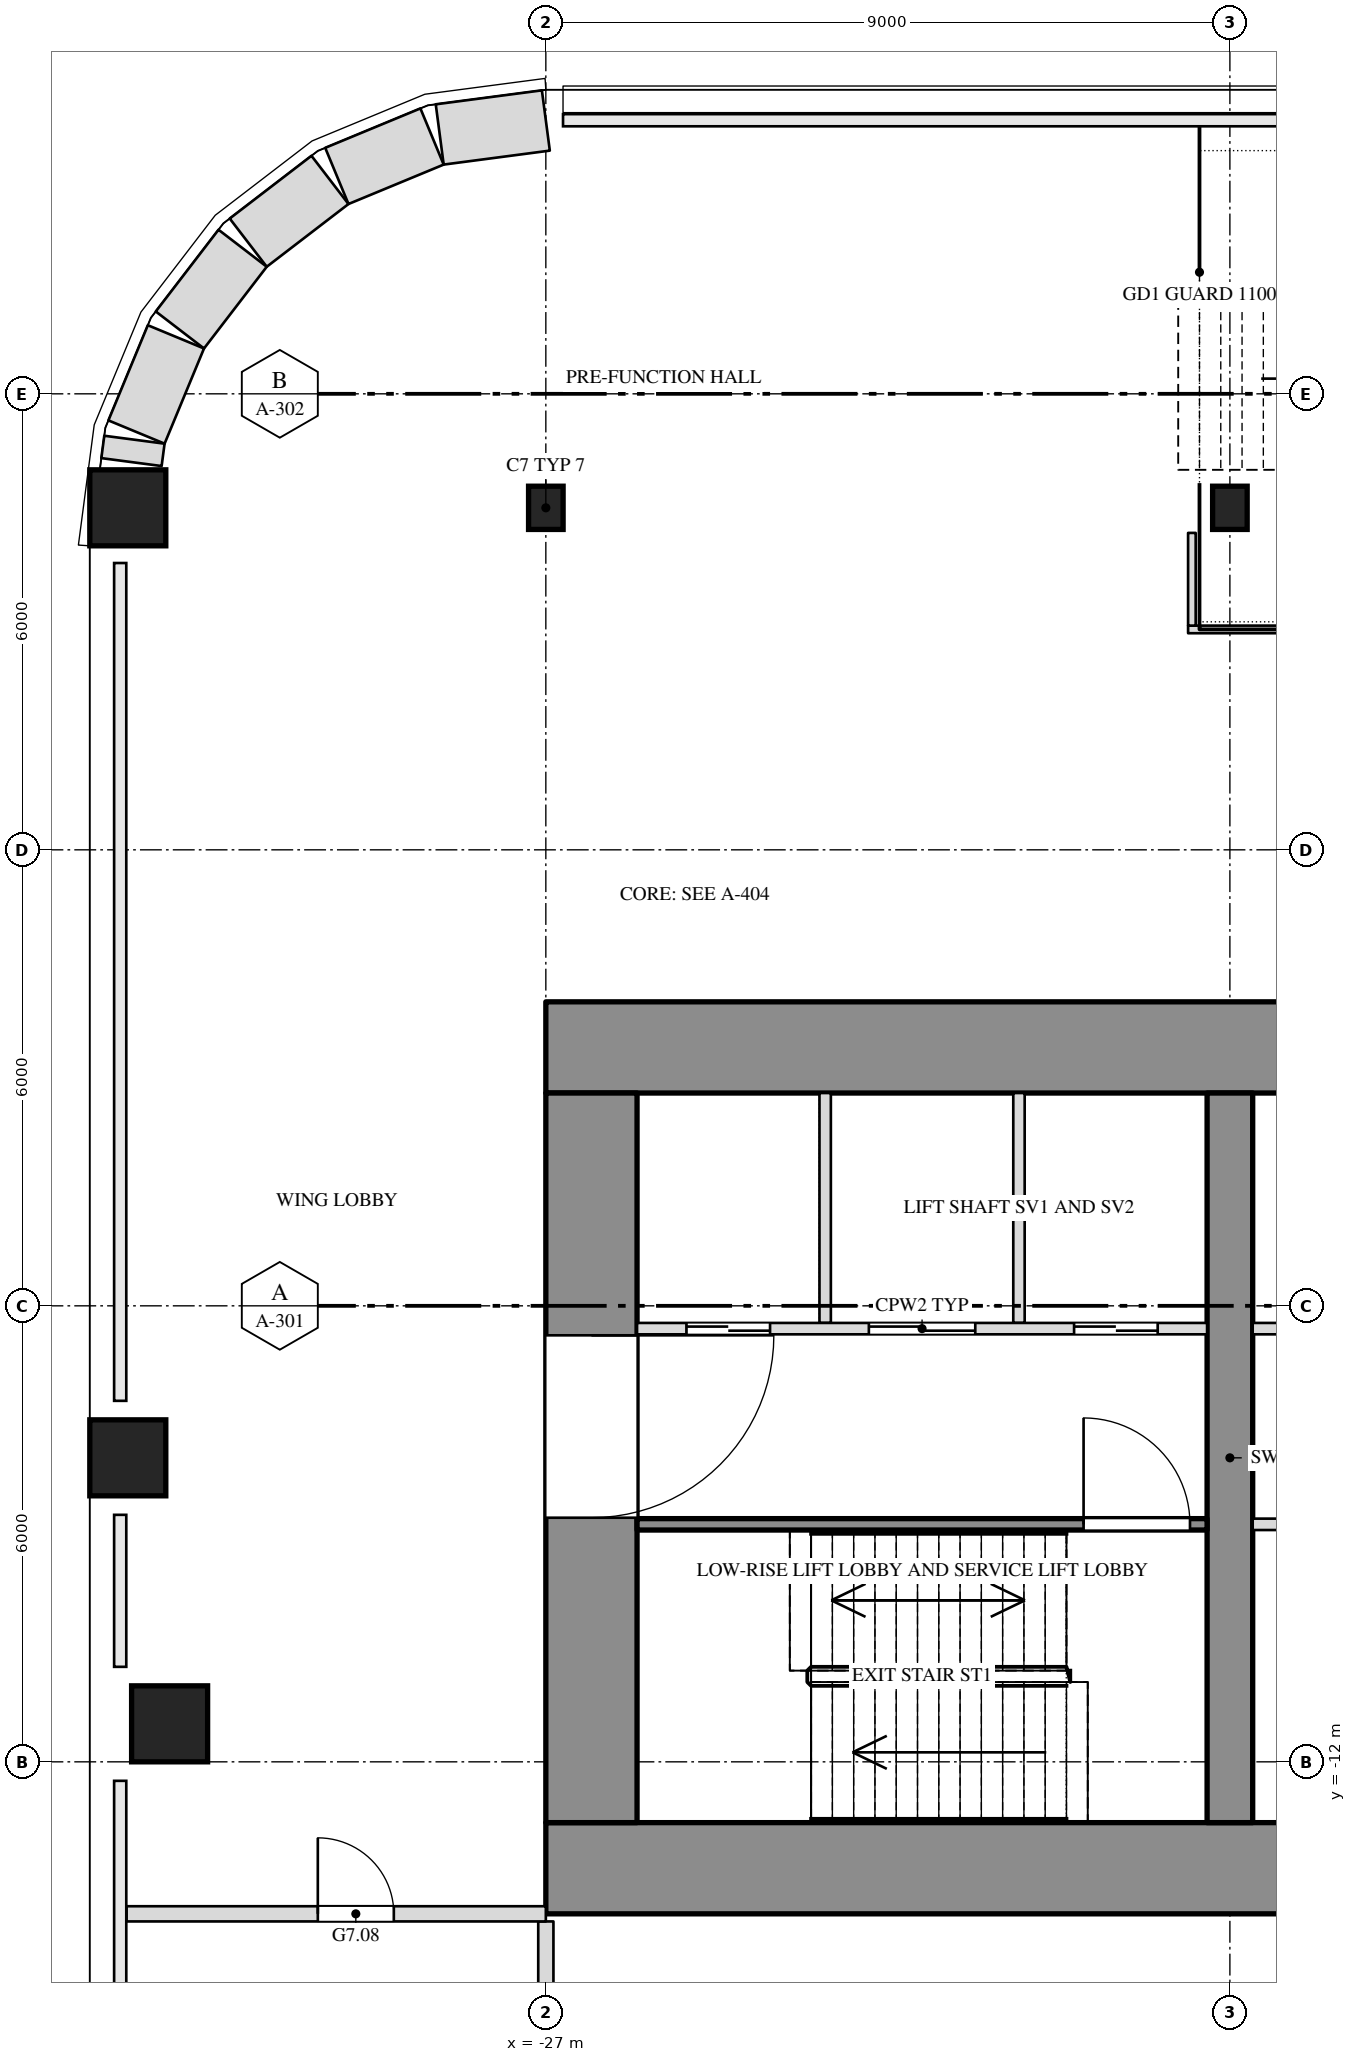
"""IFC4 building model, lengths in metres.
Left out: names, types, materials, properties, quantities, classifications, styles, units other than length and angle.
Written with IfcOpenShell. Run it as: python <this file> out.ifc"""

import sys

from ifc_helpers import new_model, si_unit, direction, frame, frame_2d, origin, origin_2d, place, context, subcontext, project, spatial, rectangle, i_section, extrude, element, fill, save


model = new_model("IFC4")
c1 = context("Model", 3, precision=1e-05, world=origin(), true_north=direction((0.0, 1.0)))
c2 = subcontext(c1, "Body", "Model", "MODEL_VIEW")
j1 = project(units=[si_unit("LENGTHUNIT", "METRE"), si_unit("PLANEANGLEUNIT", "RADIAN")], contexts=[c1])
p1 = place(None, origin())
s1 = spatial("IfcSite", under=j1, at=p1, CompositionType="ELEMENT")
p2 = place(p1, origin())
s2 = spatial("IfcBuilding", under=s1, at=p2, CompositionType="ELEMENT")
p3 = place(p2, frame((0.0, 0.0, 43.5)))
s3 = spatial("IfcBuildingStorey", under=s2, at=p3, CompositionType="ELEMENT", Elevation=43.5)
for number, where, z_axis, x_axis in (
    (1, (-31.95, -11.5, 0.0), (0.0, 0.0, 1.0), (1.0, 0.0, 0.0)),
    (2, (-32.5, -8.0, 0.0), (0.0, 0.0, 1.0), (1.0, 0.0, 0.0)),
    (3, (-32.5, 4.5, 0.0), (0.0, 0.0, 1.0), (1.0, 0.0, 0.0)),
):
    element("IfcColumn", number, at=place(p3, frame(where, z_axis=z_axis, x_axis=x_axis)), inside=s3, PredefinedType="COLUMN", context=c2, shape_type="SweptSolid", body=[
        extrude(rectangle(XDim=1.0, YDim=1.0, at=origin_2d()), origin(), (0.0, 0.0, 1.0), 4.5),
    ])
for number, where, z_axis, x_axis in (
    (4, (-27.0, 4.5, 0.0), (0.0, 0.0, 1.0), (1.0, 0.0, 0.0)),
    (5, (-18.0, 4.5, 0.0), (0.0, 0.0, 1.0), (1.0, 0.0, 0.0)),
):
    element("IfcColumn", number, at=place(p3, frame(where, z_axis=z_axis, x_axis=x_axis)), inside=s3, PredefinedType="COLUMN", context=c2, shape_type="SweptSolid", body=[
        extrude(i_section(OverallWidth=0.455, OverallDepth=0.569, WebThickness=0.078, FlangeThickness=0.125, at=origin_2d()), origin(), (0.0, 0.0, 1.0), 4.5),
    ])
p4 = place(p3, frame((-27.0, -2.6, 0.0), z_axis=(0.0, 0.0, 1.0), x_axis=(1.0, 0.0, 0.0)))
e6 = element("IfcWall", 6, at=p4, inside=s3, PredefinedType="SHEAR", context=c2, shape_type="SweptSolid", body=[
    extrude(rectangle(XDim=54.0, YDim=1.2, at=frame_2d((27.0, 0.0))), origin(), (0.0, 0.0, 1.0), 4.25),
])
p5 = place(p4, frame((15.15, 0.0, 0.0)))
e7 = element("IfcOpeningElement", 7, at=p5, cuts=e6, PredefinedType="OPENING", context=c2, shape_type="SweptSolid", body=[
    extrude(rectangle(XDim=2.4, YDim=2.1, at=frame_2d((1.2, 1.05))), frame((0.0, 0.612, 0.0), z_axis=(0.0, -1.0, 0.0), x_axis=(1.0, 0.0, 0.0)), (0.0, 0.0, 1.0), 1.224),
])
p6 = place(p4, frame((36.45, 0.0, 0.0)))
e8 = element("IfcOpeningElement", 8, at=p6, cuts=e6, PredefinedType="OPENING", context=c2, shape_type="SweptSolid", body=[
    extrude(rectangle(XDim=2.4, YDim=2.1, at=frame_2d((1.2, 1.05))), frame((0.0, 0.612, 0.0), z_axis=(0.0, -1.0, 0.0), x_axis=(1.0, 0.0, 0.0)), (0.0, 0.0, 1.0), 1.224),
])
p7 = place(p3, frame((-27.0, -13.4, 0.0), z_axis=(0.0, 0.0, 1.0), x_axis=(1.0, 0.0, 0.0)))
e9 = element("IfcWall", 9, at=p7, inside=s3, PredefinedType="SHEAR", context=c2, shape_type="SweptSolid", body=[
    extrude(rectangle(XDim=54.0, YDim=1.2, at=frame_2d((27.0, 0.0))), origin(), (0.0, 0.0, 1.0), 4.25),
])
p8 = place(p7, frame((16.45, 0.0, 0.0)))
e10 = element("IfcOpeningElement", 10, at=p8, cuts=e9, PredefinedType="OPENING", context=c2, shape_type="SweptSolid", body=[
    extrude(rectangle(XDim=1.0, YDim=2.1, at=frame_2d((0.5, 1.05))), frame((0.0, 0.612, 0.0), z_axis=(0.0, -1.0, 0.0), x_axis=(1.0, 0.0, 0.0)), (0.0, 0.0, 1.0), 1.224),
])
p9 = place(p7, frame((36.55, 0.0, 0.0)))
e11 = element("IfcOpeningElement", 11, at=p9, cuts=e9, PredefinedType="OPENING", context=c2, shape_type="SweptSolid", body=[
    extrude(rectangle(XDim=1.0, YDim=2.1, at=frame_2d((0.5, 1.05))), frame((0.0, 0.612, 0.0), z_axis=(0.0, -1.0, 0.0), x_axis=(1.0, 0.0, 0.0)), (0.0, 0.0, 1.0), 1.224),
])
p10 = place(p3, frame((-26.4, -12.8, 0.0), z_axis=(0.0, 0.0, 1.0), x_axis=(0.0, 1.0, 0.0)))
e12 = element("IfcWall", 12, at=p10, inside=s3, PredefinedType="SHEAR", context=c2, shape_type="SweptSolid", body=[
    extrude(rectangle(XDim=9.6, YDim=1.2, at=frame_2d((4.8, 0.0))), origin(), (0.0, 0.0, 1.0), 4.25),
])
p11 = place(p10, frame((4.012, 0.0, 0.0)))
e13 = element("IfcOpeningElement", 13, at=p11, cuts=e12, PredefinedType="OPENING", context=c2, shape_type="SweptSolid", body=[
    extrude(rectangle(XDim=2.4, YDim=2.1, at=frame_2d((1.2, 1.05))), frame((0.0, 0.612, 0.0), z_axis=(0.0, -1.0, 0.0), x_axis=(1.0, 0.0, 0.0)), (0.0, 0.0, 1.0), 1.224),
])
p12 = place(p3, frame((-18.0, -12.8, 0.0), z_axis=(0.0, 0.0, 1.0), x_axis=(0.0, 1.0, 0.0)))
e14 = element("IfcWall", 14, at=p12, inside=s3, PredefinedType="SHEAR", context=c2, shape_type="SweptSolid", body=[
    extrude(rectangle(XDim=9.6, YDim=0.6, at=frame_2d((4.8, 0.0))), origin(), (0.0, 0.0, 1.0), 4.25),
])
p13 = place(p3, frame((-27.0, -17.0, 0.0), z_axis=(0.0, 0.0, 1.0), x_axis=(0.0, 1.0, 0.0)))
e15 = element("IfcWall", 15, at=p13, inside=s3, PredefinedType="PARTITIONING", context=c2, shape_type="SweptSolid", body=[
    extrude(rectangle(XDim=2.9, YDim=0.2, at=frame_2d((1.45, 0.0))), origin(), (0.0, 0.0, 1.0), 3.638),
])
p14 = place(p3, frame((-32.516, -14.0, 0.0), z_axis=(0.0, 0.0, 1.0), x_axis=(1.0, 0.0, 0.0)))
e16 = element("IfcWall", 16, at=p14, inside=s3, PredefinedType="PARTITIONING", context=c2, shape_type="SweptSolid", body=[
    extrude(rectangle(XDim=5.516, YDim=0.2, at=frame_2d((2.758, 0.0))), origin(), (0.0, 0.0, 1.0), 4.25),
])
p15 = place(p14, frame((2.516, 0.0, 0.0)))
e17 = element("IfcOpeningElement", 17, at=p15, cuts=e16, PredefinedType="OPENING", context=c2, shape_type="SweptSolid", body=[
    extrude(rectangle(XDim=1.0, YDim=2.1, at=frame_2d((0.5, 1.05))), frame((0.0, 0.112, 0.0), z_axis=(0.0, -1.0, 0.0), x_axis=(1.0, 0.0, 0.0)), (0.0, 0.0, 1.0), 0.224),
])
p16 = place(p3, frame((-18.55, 2.9, 0.0), z_axis=(0.0, 0.0, 1.0), x_axis=(1.0, 0.0, 0.0)))
e18 = element("IfcWall", 18, at=p16, inside=s3, PredefinedType="PARTITIONING", context=c2, shape_type="SweptSolid", body=[
    extrude(rectangle(XDim=51.066, YDim=0.1, at=frame_2d((25.533, 0.0))), origin(), (0.0, 0.0, 1.0), 4.25),
])
p17 = place(p16, frame((40.65, 0.0, 0.0)))
e19 = element("IfcOpeningElement", 19, at=p17, cuts=e18, PredefinedType="OPENING", context=c2, shape_type="SweptSolid", body=[
    extrude(rectangle(XDim=1.8, YDim=2.1, at=frame_2d((0.9, 1.05))), frame((0.0, 0.062, 0.0), z_axis=(0.0, -1.0, 0.0), x_axis=(1.0, 0.0, 0.0)), (0.0, 0.0, 1.0), 0.124),
])
p18 = place(p16, frame((47.55, 0.0, 0.0)))
e20 = element("IfcOpeningElement", 20, at=p18, cuts=e18, PredefinedType="OPENING", context=c2, shape_type="SweptSolid", body=[
    extrude(rectangle(XDim=1.0, YDim=2.1, at=frame_2d((0.5, 1.05))), frame((0.0, 0.062, 0.0), z_axis=(0.0, -1.0, 0.0), x_axis=(1.0, 0.0, 0.0)), (0.0, 0.0, 1.0), 0.124),
])
p19 = place(p3, frame((-18.5, 2.95, 0.0), z_axis=(0.0, 0.0, 1.0), x_axis=(0.0, 1.0, 0.0)))
e21 = element("IfcWall", 21, at=p19, inside=s3, PredefinedType="PARTITIONING", context=c2, shape_type="SweptSolid", body=[
    extrude(rectangle(XDim=1.22, YDim=0.1, at=frame_2d((0.61, 0.0))), origin(), (0.0, 0.0, 1.0), 4.25),
])
p20 = place(p3, frame((-27.0, 9.597, 0.0), z_axis=(0.0, 0.0, 1.0), x_axis=(-0.99144603414, -0.130517283865, 0.0)))
e22 = element("IfcWall", 22, at=p20, inside=s3, PredefinedType="SOLIDWALL", context=c2, shape_type="SweptSolid", body=[
    extrude(rectangle(XDim=1.408, YDim=0.8, at=frame_2d((0.704, 0.0))), origin(), (0.0, 0.0, 1.0), 4.25),
])
p21 = place(p3, frame((-28.497, 9.386, 0.0), z_axis=(0.0, 0.0, 1.0), x_axis=(-0.923847774587, -0.38276009378, 0.0)))
e23 = element("IfcWall", 23, at=p21, inside=s3, PredefinedType="SOLIDWALL", context=c2, shape_type="SweptSolid", body=[
    extrude(rectangle(XDim=1.355, YDim=0.8, at=frame_2d((0.678, 0.0))), origin(), (0.0, 0.0, 1.0), 4.25),
])
for number, where, z_axis, x_axis in (
    (24, (-29.84, 8.815, 0.0), (0.0, 0.0, 1.0), (-0.793, -0.609, 0.0)),
    (25, (-30.989, 7.916, 0.0), (0.0, 0.0, 1.0), (-0.609, -0.793, 0.0)),
):
    element("IfcWall", number, at=place(p3, frame(where, z_axis=z_axis, x_axis=x_axis)), inside=s3, PredefinedType="SOLIDWALL", context=c2, shape_type="SweptSolid", body=[
        extrude(rectangle(XDim=1.356, YDim=0.8, at=frame_2d((0.678, 0.0))), origin(), (0.0, 0.0, 1.0), 4.25),
    ])
p22 = place(p3, frame((-31.867, 6.75, 0.0), z_axis=(0.0, 0.0, 1.0), x_axis=(-0.38276009378, -0.923847774587, 0.0)))
e26 = element("IfcWall", 26, at=p22, inside=s3, PredefinedType="SOLIDWALL", context=c2, shape_type="SweptSolid", body=[
    extrude(rectangle(XDim=1.355, YDim=0.8, at=frame_2d((0.678, 0.0))), origin(), (0.0, 0.0, 1.0), 4.25),
])
p23 = place(p3, frame((-32.413, 5.396, 0.0), z_axis=(0.0, 0.0, 1.0), x_axis=(-0.129901534033, -0.991526899008, 0.0)))
e27 = element("IfcWall", 27, at=p23, inside=s3, PredefinedType="SOLIDWALL", context=c2, shape_type="SweptSolid", body=[
    extrude(rectangle(XDim=0.297, YDim=0.8, at=frame_2d((0.148, 0.0))), origin(), (0.0, 0.0, 1.0), 4.25),
])
for number, where, z_axis, x_axis in (
    (28, (-20.775, -6.225, 0.0), (0.0, 0.0, 1.0), (0.0, 1.0, 0.0)),
    (29, (-23.325, -6.225, 0.0), (0.0, 0.0, 1.0), (0.0, 1.0, 0.0)),
):
    element("IfcWall", number, at=place(p3, frame(where, z_axis=z_axis, x_axis=x_axis)), inside=s3, PredefinedType="PARTITIONING", context=c2, shape_type="SweptSolid", body=[
        extrude(rectangle(XDim=3.025, YDim=0.15, at=frame_2d((1.513, 0.0))), origin(), (0.0, 0.0, 1.0), 4.25),
    ])
p24 = place(p3, frame((-25.8, -6.3, 0.0), z_axis=(0.0, 0.0, 1.0), x_axis=(1.0, 0.0, 0.0)))
e30 = element("IfcWall", 30, at=p24, inside=s3, PredefinedType="PARTITIONING", context=c2, shape_type="SweptSolid", body=[
    extrude(rectangle(XDim=7.5, YDim=0.15, at=frame_2d((3.75, 0.0))), origin(), (0.0, 0.0, 1.0), 4.25),
])
p25 = place(p24, frame((0.65, 0.0, 0.0)))
e31 = element("IfcOpeningElement", 31, at=p25, cuts=e30, PredefinedType="OPENING", context=c2, shape_type="SweptSolid", body=[
    extrude(rectangle(XDim=1.1, YDim=2.1, at=frame_2d((0.55, 1.05))), frame((0.0, 0.087, 0.0), z_axis=(0.0, -1.0, 0.0), x_axis=(1.0, 0.0, 0.0)), (0.0, 0.0, 1.0), 0.174),
])
p26 = place(p24, frame((3.05, 0.0, 0.0)))
e32 = element("IfcOpeningElement", 32, at=p26, cuts=e30, PredefinedType="OPENING", context=c2, shape_type="SweptSolid", body=[
    extrude(rectangle(XDim=1.4, YDim=2.1, at=frame_2d((0.7, 1.05))), frame((0.0, 0.087, 0.0), z_axis=(0.0, -1.0, 0.0), x_axis=(1.0, 0.0, 0.0)), (0.0, 0.0, 1.0), 0.174),
])
p27 = place(p24, frame((5.75, 0.0, 0.0)))
e33 = element("IfcOpeningElement", 33, at=p27, cuts=e30, PredefinedType="OPENING", context=c2, shape_type="SweptSolid", body=[
    extrude(rectangle(XDim=1.1, YDim=2.1, at=frame_2d((0.55, 1.05))), frame((0.0, 0.087, 0.0), z_axis=(0.0, -1.0, 0.0), x_axis=(1.0, 0.0, 0.0)), (0.0, 0.0, 1.0), 0.174),
])
p28 = place(p3, frame((-17.7, -6.3, 0.0), z_axis=(0.0, 0.0, 1.0), x_axis=(1.0, 0.0, 0.0)))
e34 = element("IfcWall", 34, at=p28, inside=s3, PredefinedType="PARTITIONING", context=c2, shape_type="SweptSolid", body=[
    extrude(rectangle(XDim=5.7, YDim=0.15, at=frame_2d((2.85, 0.0))), origin(), (0.0, 0.0, 1.0), 4.25),
])
p29 = place(p28, frame((0.8, 0.0, 0.0)))
e35 = element("IfcOpeningElement", 35, at=p29, cuts=e34, PredefinedType="OPENING", context=c2, shape_type="SweptSolid", body=[
    extrude(rectangle(XDim=1.1, YDim=2.1, at=frame_2d((0.55, 1.05))), frame((0.0, 0.087, 0.0), z_axis=(0.0, -1.0, 0.0), x_axis=(1.0, 0.0, 0.0)), (0.0, 0.0, 1.0), 0.174),
])
p30 = place(p28, frame((3.65, 0.0, 0.0)))
e36 = element("IfcOpeningElement", 36, at=p30, cuts=e34, PredefinedType="OPENING", context=c2, shape_type="SweptSolid", body=[
    extrude(rectangle(XDim=1.1, YDim=2.1, at=frame_2d((0.55, 1.05))), frame((0.0, 0.087, 0.0), z_axis=(0.0, -1.0, 0.0), x_axis=(1.0, 0.0, 0.0)), (0.0, 0.0, 1.0), 0.174),
])
p31 = place(p3, frame((-25.8, -8.875, 0.0), z_axis=(0.0, 0.0, 1.0), x_axis=(1.0, 0.0, 0.0)))
e37 = element("IfcWall", 37, at=p31, inside=s3, PredefinedType="SHEAR", context=c2, shape_type="SweptSolid", body=[
    extrude(rectangle(XDim=7.5, YDim=0.15, at=frame_2d((3.75, 0.0))), origin(), (0.0, 0.0, 1.0), 4.25),
])
p32 = place(p31, frame((5.875, 0.0, 0.0)))
e38 = element("IfcOpeningElement", 38, at=p32, cuts=e37, PredefinedType="OPENING", context=c2, shape_type="SweptSolid", body=[
    extrude(rectangle(XDim=1.4, YDim=2.1, at=frame_2d((0.7, 1.05))), frame((0.0, 0.087, 0.0), z_axis=(0.0, -1.0, 0.0), x_axis=(1.0, 0.0, 0.0)), (0.0, 0.0, 1.0), 0.174),
])
p33 = place(p3, frame((-17.7, -8.875, 0.0), z_axis=(0.0, 0.0, 1.0), x_axis=(1.0, 0.0, 0.0)))
e39 = element("IfcWall", 39, at=p33, inside=s3, PredefinedType="PARTITIONING", context=c2, shape_type="SweptSolid", body=[
    extrude(rectangle(XDim=6.9, YDim=0.15, at=frame_2d((3.45, 0.0))), origin(), (0.0, 0.0, 1.0), 4.25),
])
p34 = place(p33, frame((0.8, 0.0, 0.0)))
e40 = element("IfcOpeningElement", 40, at=p34, cuts=e39, PredefinedType="OPENING", context=c2, shape_type="SweptSolid", body=[
    extrude(rectangle(XDim=1.1, YDim=2.1, at=frame_2d((0.55, 1.05))), frame((0.0, 0.087, 0.0), z_axis=(0.0, -1.0, 0.0), x_axis=(1.0, 0.0, 0.0)), (0.0, 0.0, 1.0), 0.174),
])
p35 = place(p33, frame((3.65, 0.0, 0.0)))
e41 = element("IfcOpeningElement", 41, at=p35, cuts=e39, PredefinedType="OPENING", context=c2, shape_type="SweptSolid", body=[
    extrude(rectangle(XDim=1.1, YDim=2.1, at=frame_2d((0.55, 1.05))), frame((0.0, 0.087, 0.0), z_axis=(0.0, -1.0, 0.0), x_axis=(1.0, 0.0, 0.0)), (0.0, 0.0, 1.0), 0.174),
])
p36 = place(p15, origin())
e42 = element("IfcDoor", 42, at=p36, inside=s3, OperationType="SINGLE_SWING_LEFT", PredefinedType="DOOR", context=c2, shape_type="SweptSolid", body=[
    extrude(rectangle(XDim=1.0, YDim=2.1, at=frame_2d((0.5, 1.05))), frame((0.0, 0.025, 0.0), z_axis=(0.0, -1.0, 0.0), x_axis=(1.0, 0.0, 0.0)), (0.0, 0.0, 1.0), 0.05),
])
fill(e17, e42)
p37 = place(p11, origin())
e43 = element("IfcDoor", 43, at=p37, inside=s3, OperationType="DOUBLE_DOOR_SINGLE_SWING", PredefinedType="DOOR", context=c2, shape_type="SweptSolid", body=[
    extrude(rectangle(XDim=2.4, YDim=2.1, at=frame_2d((1.2, 1.05))), frame((0.0, 0.025, 0.0), z_axis=(0.0, -1.0, 0.0), x_axis=(1.0, 0.0, 0.0)), (0.0, 0.0, 1.0), 0.05),
])
fill(e13, e43)
p38 = place(p25, origin())
e44 = element("IfcDoor", 44, at=p38, inside=s3, OperationType="SLIDING_TO_RIGHT", PredefinedType="DOOR", context=c2, shape_type="SweptSolid", body=[
    extrude(rectangle(XDim=1.1, YDim=2.1, at=frame_2d((0.55, 1.05))), frame((0.0, 0.025, 0.0), z_axis=(0.0, -1.0, 0.0), x_axis=(1.0, 0.0, 0.0)), (0.0, 0.0, 1.0), 0.05),
])
fill(e31, e44)
p39 = place(p26, origin())
e45 = element("IfcDoor", 45, at=p39, inside=s3, OperationType="SLIDING_TO_LEFT", PredefinedType="DOOR", context=c2, shape_type="SweptSolid", body=[
    extrude(rectangle(XDim=1.4, YDim=2.1, at=frame_2d((0.7, 1.05))), frame((0.0, 0.025, 0.0), z_axis=(0.0, -1.0, 0.0), x_axis=(1.0, 0.0, 0.0)), (0.0, 0.0, 1.0), 0.05),
])
fill(e32, e45)
p40 = place(p27, origin())
e46 = element("IfcDoor", 46, at=p40, inside=s3, OperationType="SLIDING_TO_RIGHT", PredefinedType="DOOR", context=c2, shape_type="SweptSolid", body=[
    extrude(rectangle(XDim=1.1, YDim=2.1, at=frame_2d((0.55, 1.05))), frame((0.0, 0.025, 0.0), z_axis=(0.0, -1.0, 0.0), x_axis=(1.0, 0.0, 0.0)), (0.0, 0.0, 1.0), 0.05),
])
fill(e33, e46)
p41 = place(p32, origin())
e47 = element("IfcDoor", 47, at=p41, inside=s3, OperationType="DOUBLE_DOOR_SINGLE_SWING", PredefinedType="DOOR", context=c2, shape_type="SweptSolid", body=[
    extrude(rectangle(XDim=1.4, YDim=2.1, at=frame_2d((0.7, 1.05))), frame((0.0, 0.025, 0.0), z_axis=(0.0, -1.0, 0.0), x_axis=(1.0, 0.0, 0.0)), (0.0, 0.0, 1.0), 0.05),
])
fill(e38, e47)
save(model, sys.argv[1])
